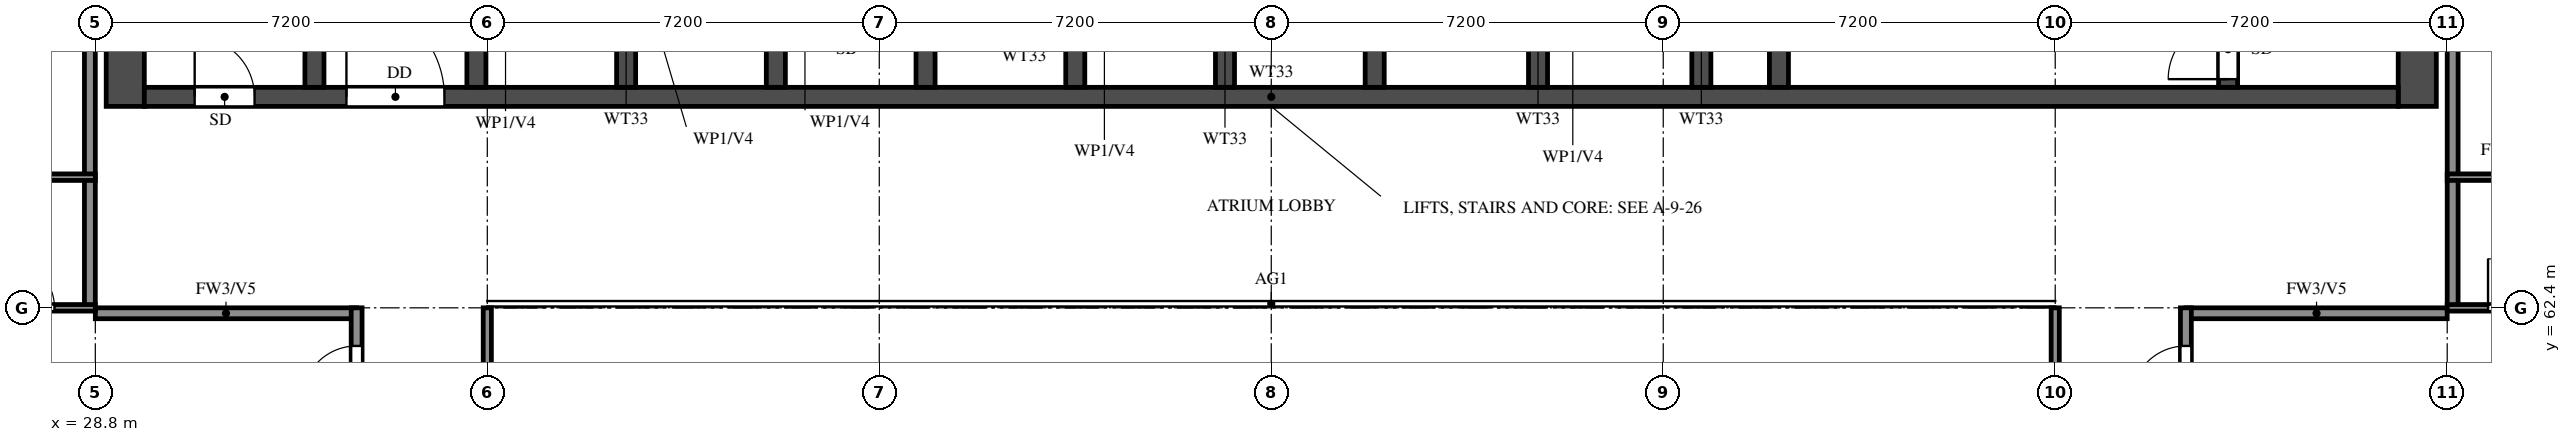
"""IFC4 building model, lengths in metres.
Left out: names, types, materials, properties, quantities, classifications, styles, units other than length and angle.
Written with IfcOpenShell. Run it as: python <this file> out.ifc"""

import sys

from ifc_helpers import new_model, si_unit, direction, frame, frame_2d, origin, place, context, subcontext, project, spatial, rectangle, extrude, element, fill, save


model = new_model("IFC4")
c1 = context("Model", 3, precision=1e-05, world=origin(), true_north=direction((0.0, 1.0)))
c2 = subcontext(c1, "Body", "Model", "MODEL_VIEW")
j1 = project(units=[si_unit("LENGTHUNIT", "METRE"), si_unit("PLANEANGLEUNIT", "RADIAN")], contexts=[c1])
p1 = place(None, origin())
s1 = spatial("IfcSite", under=j1, at=p1, CompositionType="ELEMENT")
p2 = place(p1, origin())
s2 = spatial("IfcBuilding", under=s1, at=p2, CompositionType="ELEMENT")
p3 = place(p2, frame((0.0, 0.0, 202.5)))
s3 = spatial("IfcBuildingStorey", under=s2, at=p3, CompositionType="ELEMENT", Elevation=202.5)
for number, where, z_axis, x_axis in (
    (1, (29.35, 66.1, 0.0), (0.0, 0.0, 1.0), (0.0, 1.0, 0.0)),
    (2, (71.45, 66.1, 0.0), (0.0, 0.0, 1.0), (0.0, 1.0, 0.0)),
):
    element("IfcWall", number, at=place(p3, frame(where, z_axis=z_axis, x_axis=x_axis)), inside=s3, PredefinedType="SHEAR", context=c2, shape_type="SweptSolid", body=[
        extrude(rectangle(XDim=11.9, YDim=0.7, at=frame_2d((5.95, 0.0))), origin(), (0.0, 0.0, 1.0), 3.1),
    ])
p4 = place(p3, frame((29.7, 66.275, 0.0), z_axis=(0.0, 0.0, 1.0), x_axis=(1.0, 0.0, 0.0)))
e3 = element("IfcWall", 3, at=p4, inside=s3, PredefinedType="SHEAR", context=c2, shape_type="SweptSolid", body=[
    extrude(rectangle(XDim=41.4, YDim=0.35, at=frame_2d((20.7, 0.0))), origin(), (0.0, 0.0, 1.0), 3.1),
])
p5 = place(p4, frame((0.925, 0.0, 0.0)))
e4 = element("IfcOpeningElement", 4, at=p5, cuts=e3, PredefinedType="OPENING", context=c2, shape_type="SweptSolid", body=[
    extrude(rectangle(XDim=1.1, YDim=2.1, at=frame_2d((0.55, 1.05))), frame((0.0, 0.185, 0.0), z_axis=(0.0, -1.0, 0.0), x_axis=(1.0, 0.0, 0.0)), (0.0, 0.0, 1.0), 0.37),
])
p6 = place(p4, frame((3.712, 0.0, 0.0)))
e5 = element("IfcOpeningElement", 5, at=p6, cuts=e3, PredefinedType="OPENING", context=c2, shape_type="SweptSolid", body=[
    extrude(rectangle(XDim=1.8, YDim=2.1, at=frame_2d((0.9, 1.05))), frame((0.0, 0.185, 0.0), z_axis=(0.0, -1.0, 0.0), x_axis=(1.0, 0.0, 0.0)), (0.0, 0.0, 1.0), 0.37),
])
p7 = place(p3, frame((32.825, 66.45, 0.0), z_axis=(0.0, 0.0, 1.0), x_axis=(0.0, 1.0, 0.0)))
e6 = element("IfcWall", 6, at=p7, inside=s3, PredefinedType="SHEAR", context=c2, shape_type="SweptSolid", body=[
    extrude(rectangle(XDim=10.85, YDim=0.35, at=frame_2d((5.425, 0.0))), origin(), (0.0, 0.0, 1.0), 3.1),
])
p8 = place(p3, frame((67.975, 66.45, 0.0), z_axis=(0.0, 0.0, 1.0), x_axis=(0.0, 1.0, 0.0)))
e7 = element("IfcWall", 7, at=p8, inside=s3, PredefinedType="SHEAR", context=c2, shape_type="SweptSolid", body=[
    extrude(rectangle(XDim=10.85, YDim=0.35, at=frame_2d((5.425, 0.0))), origin(), (0.0, 0.0, 1.0), 3.1),
])
p9 = place(p8, frame((0.15, 0.0, 0.0)))
e8 = element("IfcOpeningElement", 8, at=p9, cuts=e7, PredefinedType="OPENING", context=c2, shape_type="SweptSolid", body=[
    extrude(rectangle(XDim=1.1, YDim=2.1, at=frame_2d((0.55, 1.05))), frame((0.0, 0.185, 0.0), z_axis=(0.0, -1.0, 0.0), x_axis=(1.0, 0.0, 0.0)), (0.0, 0.0, 1.0), 0.37),
])
p10 = place(p3, frame((59.725, 66.45, 0.0), z_axis=(0.0, 0.0, 1.0), x_axis=(0.0, 1.0, 0.0)))
e9 = element("IfcWall", 9, at=p10, inside=s3, PredefinedType="SHEAR", context=c2, shape_type="SweptSolid", body=[
    extrude(rectangle(XDim=6.125, YDim=0.35, at=frame_2d((3.062, 0.0))), origin(), (0.0, 0.0, 1.0), 3.1),
])
p11 = place(p10, frame((3.85, 0.0, 0.0)))
e10 = element("IfcOpeningElement", 10, at=p11, cuts=e9, PredefinedType="OPENING", context=c2, shape_type="SweptSolid", body=[
    extrude(rectangle(XDim=1.2, YDim=2.1, at=frame_2d((0.6, 1.05))), frame((0.0, 0.185, 0.0), z_axis=(0.0, -1.0, 0.0), x_axis=(1.0, 0.0, 0.0)), (0.0, 0.0, 1.0), 0.37),
])
for number, where, z_axis, x_axis in (
    (11, (35.8, 66.45, 0.0), (0.0, 0.0, 1.0), (0.0, 1.0, 0.0)),
    (12, (38.55, 66.45, 0.0), (0.0, 0.0, 1.0), (0.0, 1.0, 0.0)),
    (13, (41.3, 66.45, 0.0), (0.0, 0.0, 1.0), (0.0, 1.0, 0.0)),
    (14, (44.05, 66.45, 0.0), (0.0, 0.0, 1.0), (0.0, 1.0, 0.0)),
    (15, (46.8, 66.45, 0.0), (0.0, 0.0, 1.0), (0.0, 1.0, 0.0)),
    (16, (49.55, 66.45, 0.0), (0.0, 0.0, 1.0), (0.0, 1.0, 0.0)),
    (17, (52.3, 66.45, 0.0), (0.0, 0.0, 1.0), (0.0, 1.0, 0.0)),
    (18, (55.3, 66.45, 0.0), (0.0, 0.0, 1.0), (0.0, 1.0, 0.0)),
    (19, (58.3, 66.45, 0.0), (0.0, 0.0, 1.0), (0.0, 1.0, 0.0)),
):
    element("IfcWall", number, at=place(p3, frame(where, z_axis=z_axis, x_axis=x_axis)), inside=s3, PredefinedType="SHEAR", context=c2, shape_type="SweptSolid", body=[
        extrude(rectangle(XDim=2.425, YDim=0.35, at=frame_2d((1.212, 0.0))), origin(), (0.0, 0.0, 1.0), 3.1),
    ])
for number, where, z_axis, x_axis in (
    (20, (28.8, 62.3, 0.0), (0.0, 0.0, 1.0), (1.0, 0.0, 0.0)),
    (21, (67.2, 62.3, 0.0), (0.0, 0.0, 1.0), (1.0, 0.0, 0.0)),
):
    element("IfcWall", number, at=place(p3, frame(where, z_axis=z_axis, x_axis=x_axis)), inside=s3, PredefinedType="SOLIDWALL", context=c2, shape_type="SweptSolid", body=[
        extrude(rectangle(XDim=4.8, YDim=0.2, at=frame_2d((2.4, 0.0))), origin(), (0.0, 0.0, 1.0), 3.1),
    ])
p12 = place(p3, frame((28.7, 62.4, 0.0), z_axis=(0.0, 0.0, 1.0), x_axis=(0.0, 1.0, 0.0)))
e22 = element("IfcWall", 22, at=p12, inside=s3, PredefinedType="SOLIDWALL", context=c2, shape_type="SweptSolid", body=[
    extrude(rectangle(XDim=15.6, YDim=0.2, at=frame_2d((7.8, 0.0))), origin(), (0.0, 0.0, 1.0), 3.1),
])
p13 = place(p3, frame((33.6, 45.6, 0.0), z_axis=(0.0, 0.0, 1.0), x_axis=(0.0, 1.0, 0.0)))
e23 = element("IfcWall", 23, at=p13, inside=s3, PredefinedType="SOLIDWALL", context=c2, shape_type="SweptSolid", body=[
    extrude(rectangle(XDim=16.8, YDim=0.2, at=frame_2d((8.4, 0.0))), origin(), (0.0, 0.0, 1.0), 3.1),
])
p14 = place(p13, frame((0.7, 0.0, 0.0)))
e24 = element("IfcOpeningElement", 24, at=p14, cuts=e23, PredefinedType="OPENING", context=c2, shape_type="SweptSolid", body=[
    extrude(rectangle(XDim=1.0, YDim=2.1, at=frame_2d((0.5, 1.05))), frame((0.0, 0.11, 0.0), z_axis=(0.0, -1.0, 0.0), x_axis=(1.0, 0.0, 0.0)), (0.0, 0.0, 1.0), 0.22),
])
p15 = place(p13, frame((8.3, 0.0, 0.0)))
e25 = element("IfcOpeningElement", 25, at=p15, cuts=e23, PredefinedType="OPENING", context=c2, shape_type="SweptSolid", body=[
    extrude(rectangle(XDim=1.0, YDim=2.1, at=frame_2d((0.5, 1.05))), frame((0.0, 0.11, 0.0), z_axis=(0.0, -1.0, 0.0), x_axis=(1.0, 0.0, 0.0)), (0.0, 0.0, 1.0), 0.22),
])
p16 = place(p13, frame((15.1, 0.0, 0.0)))
e26 = element("IfcOpeningElement", 26, at=p16, cuts=e23, PredefinedType="OPENING", context=c2, shape_type="SweptSolid", body=[
    extrude(rectangle(XDim=1.0, YDim=2.1, at=frame_2d((0.5, 1.05))), frame((0.0, 0.11, 0.0), z_axis=(0.0, -1.0, 0.0), x_axis=(1.0, 0.0, 0.0)), (0.0, 0.0, 1.0), 0.22),
])
p17 = place(p3, frame((67.2, 60.0, 0.0), z_axis=(0.0, 0.0, 1.0), x_axis=(0.0, 1.0, 0.0)))
e27 = element("IfcWall", 27, at=p17, inside=s3, PredefinedType="SOLIDWALL", context=c2, shape_type="SweptSolid", body=[
    extrude(rectangle(XDim=2.4, YDim=0.2, at=frame_2d((1.2, 0.0))), origin(), (0.0, 0.0, 1.0), 3.1),
])
p18 = place(p17, frame((0.7, 0.0, 0.0)))
e28 = element("IfcOpeningElement", 28, at=p18, cuts=e27, PredefinedType="OPENING", context=c2, shape_type="SweptSolid", body=[
    extrude(rectangle(XDim=1.0, YDim=2.1, at=frame_2d((0.5, 1.05))), frame((0.0, 0.11, 0.0), z_axis=(0.0, -1.0, 0.0), x_axis=(1.0, 0.0, 0.0)), (0.0, 0.0, 1.0), 0.22),
])
p19 = place(p3, frame((72.1, 62.4, 0.0), z_axis=(0.0, 0.0, 1.0), x_axis=(0.0, 1.0, 0.0)))
e29 = element("IfcWall", 29, at=p19, inside=s3, PredefinedType="SOLIDWALL", context=c2, shape_type="SweptSolid", body=[
    extrude(rectangle(XDim=15.6, YDim=0.2, at=frame_2d((7.8, 0.0))), origin(), (0.0, 0.0, 1.0), 3.1),
])
p20 = place(p3, frame((26.4, 62.4, 0.0), z_axis=(0.0, 0.0, 1.0), x_axis=(1.0, 0.0, 0.0)))
e30 = element("IfcWall", 30, at=p20, inside=s3, PredefinedType="PARTITIONING", context=c2, shape_type="SweptSolid", body=[
    extrude(rectangle(XDim=2.4, YDim=0.12, at=frame_2d((1.2, 0.0))), origin(), (0.0, 0.0, 1.0), 3.1),
])
p21 = place(p20, frame((0.75, 0.0, 0.0)))
e31 = element("IfcOpeningElement", 31, at=p21, cuts=e30, PredefinedType="OPENING", context=c2, shape_type="SweptSolid", body=[
    extrude(rectangle(XDim=0.9, YDim=2.1, at=frame_2d((0.45, 1.05))), frame((0.0, 0.07, 0.0), z_axis=(0.0, -1.0, 0.0), x_axis=(1.0, 0.0, 0.0)), (0.0, 0.0, 1.0), 0.14),
])
p22 = place(p3, frame((72.0, 62.4, 0.0), z_axis=(0.0, 0.0, 1.0), x_axis=(1.0, 0.0, 0.0)))
e32 = element("IfcWall", 32, at=p22, inside=s3, PredefinedType="PARTITIONING", context=c2, shape_type="SweptSolid", body=[
    extrude(rectangle(XDim=2.4, YDim=0.12, at=frame_2d((1.2, 0.0))), origin(), (0.0, 0.0, 1.0), 3.1),
])
p23 = place(p22, frame((0.75, 0.0, 0.0)))
e33 = element("IfcOpeningElement", 33, at=p23, cuts=e32, PredefinedType="OPENING", context=c2, shape_type="SweptSolid", body=[
    extrude(rectangle(XDim=0.9, YDim=2.1, at=frame_2d((0.45, 1.05))), frame((0.0, 0.07, 0.0), z_axis=(0.0, -1.0, 0.0), x_axis=(1.0, 0.0, 0.0)), (0.0, 0.0, 1.0), 0.14),
])
p24 = place(p3, frame((23.7, 64.8, 0.0), z_axis=(0.0, 0.0, 1.0), x_axis=(1.0, 0.0, 0.0)))
e34 = element("IfcWall", 34, at=p24, inside=s3, PredefinedType="PARTITIONING", context=c2, shape_type="SweptSolid", body=[
    extrude(rectangle(XDim=5.1, YDim=0.12, at=frame_2d((2.55, 0.0))), origin(), (0.0, 0.0, 1.0), 3.1),
])
p25 = place(p24, frame((2.1, 0.0, 0.0)))
e35 = element("IfcOpeningElement", 35, at=p25, cuts=e34, PredefinedType="OPENING", context=c2, shape_type="SweptSolid", body=[
    extrude(rectangle(XDim=0.9, YDim=2.1, at=frame_2d((0.45, 1.05))), frame((0.0, 0.07, 0.0), z_axis=(0.0, -1.0, 0.0), x_axis=(1.0, 0.0, 0.0)), (0.0, 0.0, 1.0), 0.14),
])
p26 = place(p3, frame((72.0, 64.8, 0.0), z_axis=(0.0, 0.0, 1.0), x_axis=(1.0, 0.0, 0.0)))
e36 = element("IfcWall", 36, at=p26, inside=s3, PredefinedType="PARTITIONING", context=c2, shape_type="SweptSolid", body=[
    extrude(rectangle(XDim=5.1, YDim=0.12, at=frame_2d((2.55, 0.0))), origin(), (0.0, 0.0, 1.0), 3.1),
])
p27 = place(p26, frame((2.1, 0.0, 0.0)))
e37 = element("IfcOpeningElement", 37, at=p27, cuts=e36, PredefinedType="OPENING", context=c2, shape_type="SweptSolid", body=[
    extrude(rectangle(XDim=0.9, YDim=2.1, at=frame_2d((0.45, 1.05))), frame((0.0, 0.07, 0.0), z_axis=(0.0, -1.0, 0.0), x_axis=(1.0, 0.0, 0.0)), (0.0, 0.0, 1.0), 0.14),
])
for number, where, z_axis, x_axis in (
    (38, (36.0, 48.0, 0.0), (0.0, 0.0, 1.0), (0.0, 1.0, 0.0)),
    (39, (64.8, 48.0, 0.0), (0.0, 0.0, 1.0), (0.0, 1.0, 0.0)),
):
    element("IfcWall", number, at=place(p3, frame(where, z_axis=z_axis, x_axis=x_axis)), inside=s3, PredefinedType="SOLIDWALL", context=c2, shape_type="SweptSolid", body=[
        extrude(rectangle(XDim=14.4, YDim=0.15, at=frame_2d((7.2, 0.0))), origin(), (0.0, 0.0, 1.0), 2.2),
    ])
p28 = place(p5, origin())
e40 = element("IfcDoor", 40, at=p28, inside=s3, OperationType="SINGLE_SWING_LEFT", PredefinedType="DOOR", context=c2, shape_type="SweptSolid", body=[
    extrude(rectangle(XDim=1.1, YDim=2.1, at=frame_2d((0.55, 1.05))), frame((0.0, 0.025, 0.0), z_axis=(0.0, -1.0, 0.0), x_axis=(1.0, 0.0, 0.0)), (0.0, 0.0, 1.0), 0.05),
])
fill(e4, e40)
p29 = place(p9, origin())
e41 = element("IfcDoor", 41, at=p29, inside=s3, OperationType="SINGLE_SWING_LEFT", PredefinedType="DOOR", context=c2, shape_type="SweptSolid", body=[
    extrude(rectangle(XDim=1.1, YDim=2.1, at=frame_2d((0.55, 1.05))), frame((0.0, 0.025, 0.0), z_axis=(0.0, -1.0, 0.0), x_axis=(1.0, 0.0, 0.0)), (0.0, 0.0, 1.0), 0.05),
])
fill(e8, e41)
p30 = place(p6, origin())
e42 = element("IfcDoor", 42, at=p30, inside=s3, OperationType="DOUBLE_DOOR_SINGLE_SWING", PredefinedType="DOOR", context=c2, shape_type="SweptSolid", body=[
    extrude(rectangle(XDim=1.8, YDim=2.1, at=frame_2d((0.9, 1.05))), frame((0.0, 0.025, 0.0), z_axis=(0.0, -1.0, 0.0), x_axis=(1.0, 0.0, 0.0)), (0.0, 0.0, 1.0), 0.05),
])
fill(e5, e42)
p31 = place(p21, origin())
e43 = element("IfcDoor", 43, at=p31, inside=s3, OperationType="SINGLE_SWING_LEFT", PredefinedType="DOOR", context=c2, shape_type="SweptSolid", body=[
    extrude(rectangle(XDim=0.9, YDim=2.1, at=frame_2d((0.45, 1.05))), frame((0.0, 0.025, 0.0), z_axis=(0.0, -1.0, 0.0), x_axis=(1.0, 0.0, 0.0)), (0.0, 0.0, 1.0), 0.05),
])
fill(e31, e43)
p32 = place(p16, origin())
e44 = element("IfcDoor", 44, at=p32, inside=s3, OperationType="SINGLE_SWING_RIGHT", PredefinedType="DOOR", context=c2, shape_type="SweptSolid", body=[
    extrude(rectangle(XDim=1.0, YDim=2.1, at=frame_2d((0.5, 1.05))), frame((0.0, 0.025, 0.0), z_axis=(0.0, -1.0, 0.0), x_axis=(1.0, 0.0, 0.0)), (0.0, 0.0, 1.0), 0.05),
])
fill(e26, e44)
p33 = place(p23, origin())
e45 = element("IfcDoor", 45, at=p33, inside=s3, OperationType="SINGLE_SWING_LEFT", PredefinedType="DOOR", context=c2, shape_type="SweptSolid", body=[
    extrude(rectangle(XDim=0.9, YDim=2.1, at=frame_2d((0.45, 1.05))), frame((0.0, 0.025, 0.0), z_axis=(0.0, -1.0, 0.0), x_axis=(1.0, 0.0, 0.0)), (0.0, 0.0, 1.0), 0.05),
])
fill(e33, e45)
p34 = place(p18, origin())
e46 = element("IfcDoor", 46, at=p34, inside=s3, OperationType="SINGLE_SWING_LEFT", PredefinedType="DOOR", context=c2, shape_type="SweptSolid", body=[
    extrude(rectangle(XDim=1.0, YDim=2.1, at=frame_2d((0.5, 1.05))), frame((0.0, 0.025, 0.0), z_axis=(0.0, -1.0, 0.0), x_axis=(1.0, 0.0, 0.0)), (0.0, 0.0, 1.0), 0.05),
])
fill(e28, e46)
save(model, sys.argv[1])
